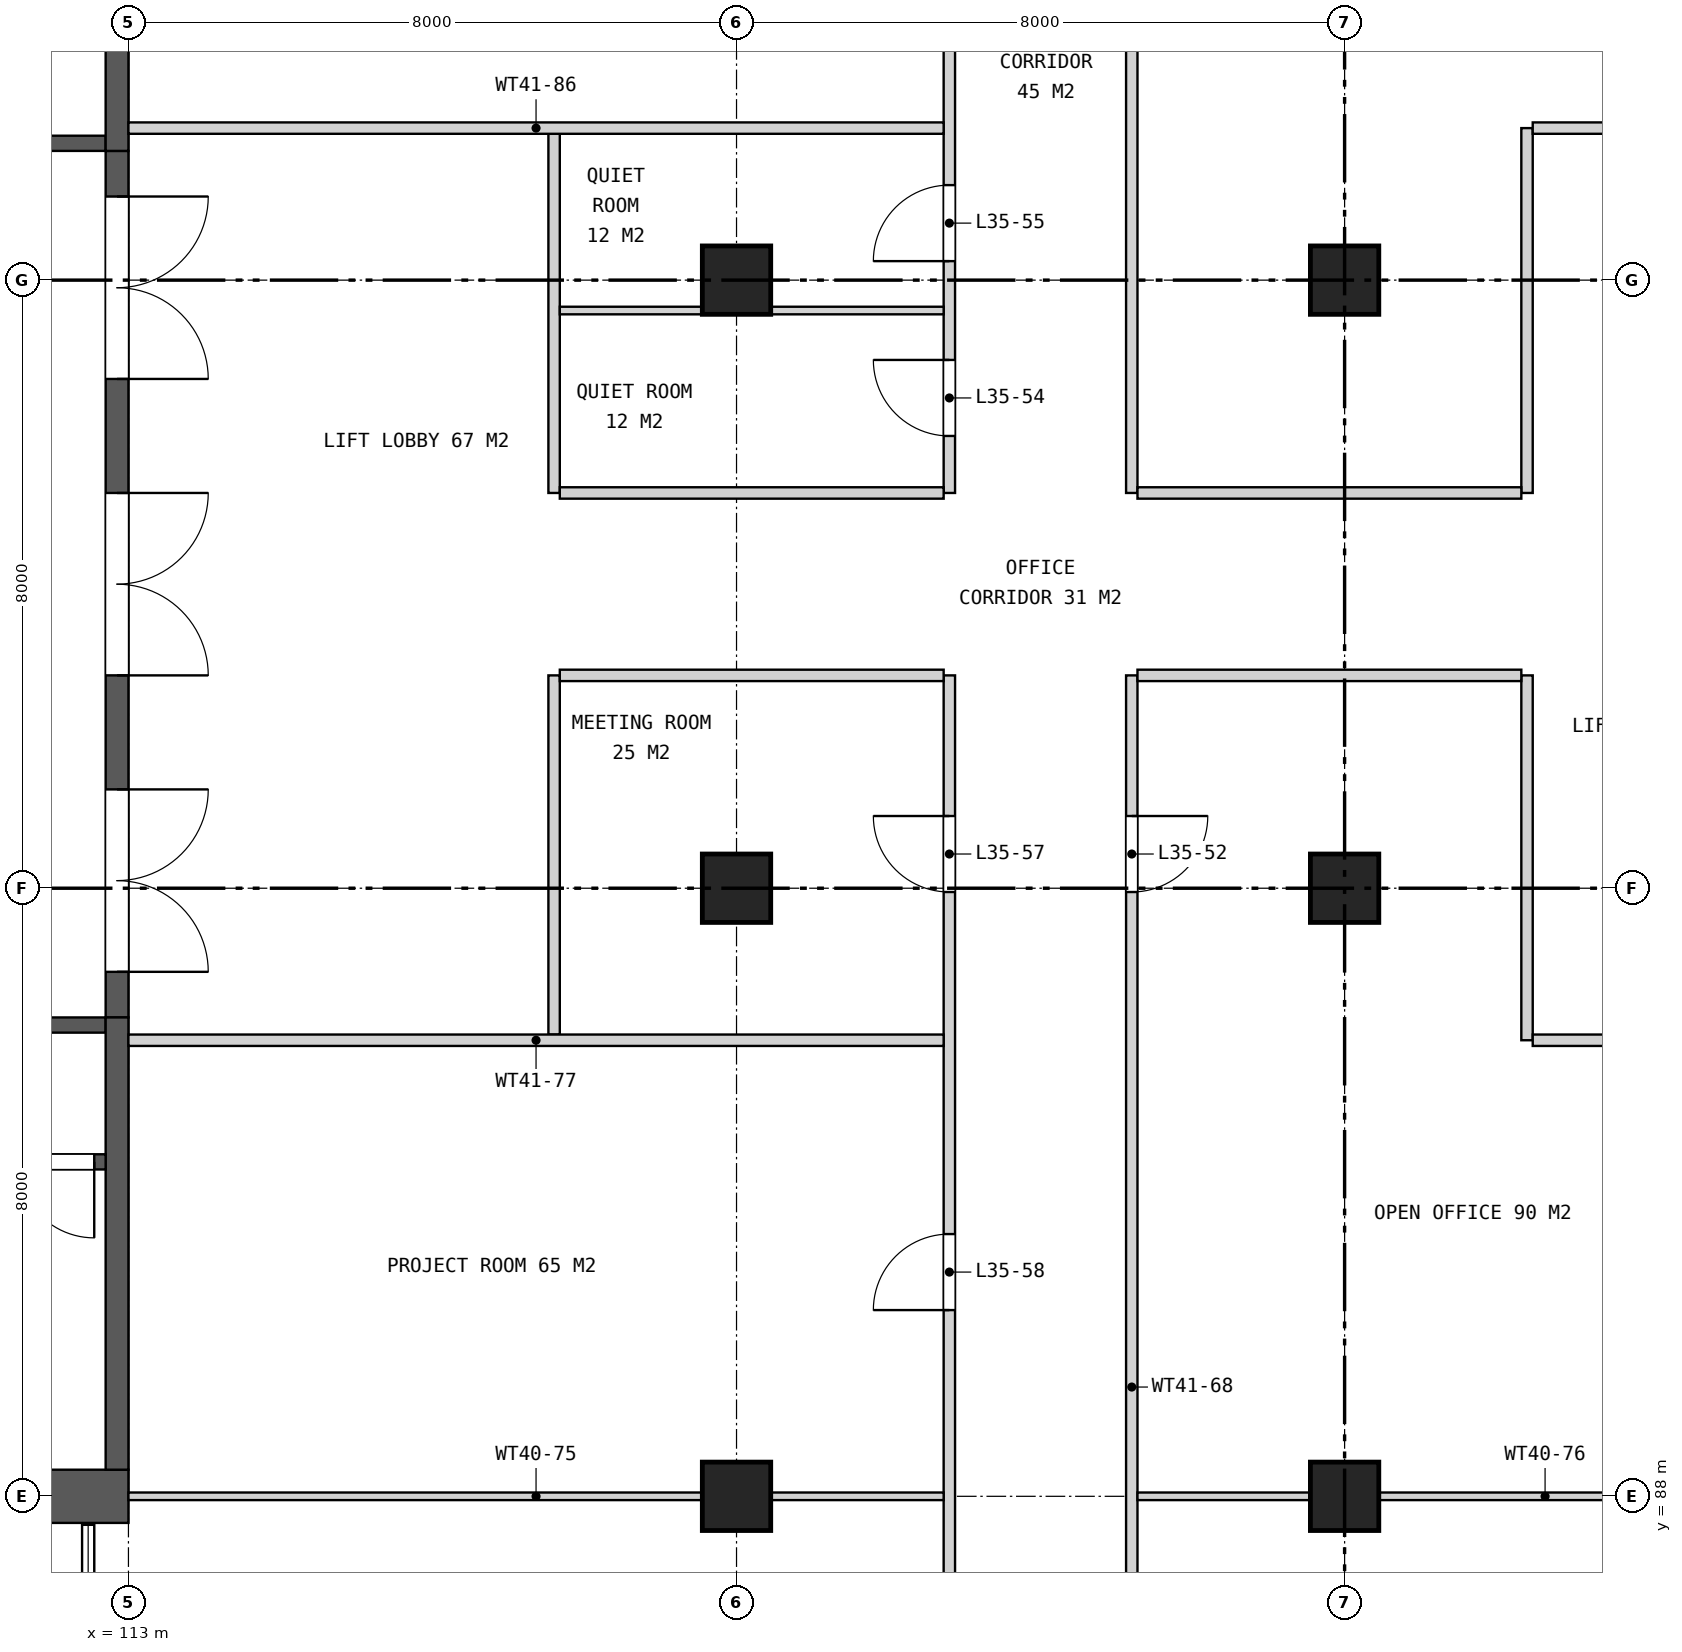
"""IFC4 building model, lengths in metres.
Left out: names, types, materials, properties, quantities, classifications, styles, units other than length and angle.
Written with IfcOpenShell. Run it as: python <this file> out.ifc"""

import sys

from ifc_helpers import new_model, si_unit, direction, frame, frame_2d, origin, origin_2d, place, context, subcontext, project, spatial, rectangle, extrude, element, fill, save


model = new_model("IFC4")
c1 = context("Model", 3, precision=1e-05, world=origin(), true_north=direction((0.0, 1.0)))
c2 = subcontext(c1, "Body", "Model", "MODEL_VIEW")
j1 = project(units=[si_unit("LENGTHUNIT", "METRE"), si_unit("PLANEANGLEUNIT", "RADIAN")], contexts=[c1])
p1 = place(None, origin())
s1 = spatial("IfcSite", under=j1, at=p1, CompositionType="ELEMENT")
p2 = place(p1, origin())
s2 = spatial("IfcBuilding", under=s1, at=p2, CompositionType="ELEMENT")
p3 = place(p2, frame((0.0, 0.0, 167.3)))
s3 = spatial("IfcBuildingStorey", under=s2, at=p3, CompositionType="ELEMENT", Elevation=167.3)
for number, where, z_axis, x_axis in (
    (1, (121.0, 88.0, 0.0), (0.0, 0.0, 1.0), (1.0, 0.0, 0.0)),
    (2, (121.0, 96.0, 0.0), (0.0, 0.0, 1.0), (1.0, 0.0, 0.0)),
    (3, (121.0, 104.0, 0.0), (0.0, 0.0, 1.0), (1.0, 0.0, 0.0)),
    (4, (129.0, 88.0, 0.0), (0.0, 0.0, 1.0), (1.0, 0.0, 0.0)),
    (5, (129.0, 96.0, 0.0), (0.0, 0.0, 1.0), (1.0, 0.0, 0.0)),
    (6, (129.0, 104.0, 0.0), (0.0, 0.0, 1.0), (1.0, 0.0, 0.0)),
):
    element("IfcColumn", number, at=place(p3, frame(where, z_axis=z_axis, x_axis=x_axis)), inside=s3, PredefinedType="COLUMN", context=c2, shape_type="SweptSolid", body=[
        extrude(rectangle(XDim=0.9, YDim=0.9, at=origin_2d()), origin(), (0.0, 0.0, 1.0), 4.2),
    ])
p4 = place(p3, frame((113.0, 88.0, 0.0), z_axis=(0.0, 0.0, 1.0), x_axis=(-1.0, 0.0, 0.0)))
e7 = element("IfcWall", 7, at=p4, inside=s3, PredefinedType="SHEAR", context=c2, shape_type="SweptSolid", body=[
    extrude(rectangle(XDim=7.1, YDim=0.7, at=frame_2d((3.55, 0.0))), origin(), (0.0, 0.0, 1.0), 4.2),
])
p5 = place(p3, frame((112.85, 105.7, 0.0), z_axis=(0.0, 0.0, 1.0), x_axis=(0.0, -1.0, 0.0)))
e8 = element("IfcWall", 8, at=p5, inside=s3, PredefinedType="SHEAR", context=c2, shape_type="SweptSolid", body=[
    extrude(rectangle(XDim=11.4, YDim=0.3, at=frame_2d((5.7, 0.0))), origin(), (0.0, 0.0, 1.0), 4.2),
])
p6 = place(p5, frame((0.6, 0.0, 0.0)))
e9 = element("IfcOpeningElement", 9, at=p6, cuts=e8, PredefinedType="OPENING", context=c2, shape_type="SweptSolid", body=[
    extrude(rectangle(XDim=2.4, YDim=2.4, at=frame_2d((1.2, 1.2))), frame((0.0, 0.16, 0.0), z_axis=(0.0, -1.0, 0.0), x_axis=(1.0, 0.0, 0.0)), (0.0, 0.0, 1.0), 0.32),
])
p7 = place(p5, frame((4.5, 0.0, 0.0)))
e10 = element("IfcOpeningElement", 10, at=p7, cuts=e8, PredefinedType="OPENING", context=c2, shape_type="SweptSolid", body=[
    extrude(rectangle(XDim=2.4, YDim=2.4, at=frame_2d((1.2, 1.2))), frame((0.0, 0.16, 0.0), z_axis=(0.0, -1.0, 0.0), x_axis=(1.0, 0.0, 0.0)), (0.0, 0.0, 1.0), 0.32),
])
p8 = place(p5, frame((8.4, 0.0, 0.0)))
e11 = element("IfcOpeningElement", 11, at=p8, cuts=e8, PredefinedType="OPENING", context=c2, shape_type="SweptSolid", body=[
    extrude(rectangle(XDim=2.4, YDim=2.4, at=frame_2d((1.2, 1.2))), frame((0.0, 0.16, 0.0), z_axis=(0.0, -1.0, 0.0), x_axis=(1.0, 0.0, 0.0)), (0.0, 0.0, 1.0), 0.32),
])
p9 = place(p3, frame((112.7, 94.2, 0.0), z_axis=(0.0, 0.0, 1.0), x_axis=(-1.0, 0.0, 0.0)))
e12 = element("IfcWall", 12, at=p9, inside=s3, PredefinedType="SHEAR", context=c2, shape_type="SweptSolid", body=[
    extrude(rectangle(XDim=15.35, YDim=0.2, at=frame_2d((7.675, 0.0))), origin(), (0.0, 0.0, 1.0), 4.2),
])
p10 = place(p9, frame((0.95, 0.0, 0.0)))
e13 = element("IfcOpeningElement", 13, at=p10, cuts=e12, PredefinedType="OPENING", context=c2, shape_type="SweptSolid", body=[
    extrude(rectangle(XDim=1.1, YDim=2.1, at=frame_2d((0.55, 1.05))), frame((0.0, 0.11, 0.0), z_axis=(0.0, -1.0, 0.0), x_axis=(1.0, 0.0, 0.0)), (0.0, 0.0, 1.0), 0.22),
])
p11 = place(p3, frame((112.85, 94.3, 0.0), z_axis=(0.0, 0.0, 1.0), x_axis=(0.0, -1.0, 0.0)))
e14 = element("IfcWall", 14, at=p11, inside=s3, PredefinedType="SHEAR", context=c2, shape_type="SweptSolid", body=[
    extrude(rectangle(XDim=5.95, YDim=0.3, at=frame_2d((2.975, 0.0))), origin(), (0.0, 0.0, 1.0), 4.2),
])
p12 = place(p3, frame((112.7, 92.4, 0.0), z_axis=(0.0, 0.0, 1.0), x_axis=(-1.0, 0.0, 0.0)))
e15 = element("IfcWall", 15, at=p12, inside=s3, PredefinedType="SHEAR", context=c2, shape_type="SweptSolid", body=[
    extrude(rectangle(XDim=6.8, YDim=0.2, at=frame_2d((3.4, 0.0))), origin(), (0.0, 0.0, 1.0), 4.2),
])
p13 = place(p12, frame((0.15, 0.0, 0.0)))
e16 = element("IfcOpeningElement", 16, at=p13, cuts=e15, PredefinedType="OPENING", context=c2, shape_type="SweptSolid", body=[
    extrude(rectangle(XDim=1.0, YDim=2.1, at=frame_2d((0.5, 1.05))), frame((0.0, 0.11, 0.0), z_axis=(0.0, -1.0, 0.0), x_axis=(1.0, 0.0, 0.0)), (0.0, 0.0, 1.0), 0.22),
])
p14 = place(p3, frame((112.7, 105.8, 0.0), z_axis=(0.0, 0.0, 1.0), x_axis=(-1.0, 0.0, 0.0)))
e17 = element("IfcWall", 17, at=p14, inside=s3, PredefinedType="SHEAR", context=c2, shape_type="SweptSolid", body=[
    extrude(rectangle(XDim=15.35, YDim=0.2, at=frame_2d((7.675, 0.0))), origin(), (0.0, 0.0, 1.0), 4.2),
])
p15 = place(p14, frame((0.95, 0.0, 0.0)))
e18 = element("IfcOpeningElement", 18, at=p15, cuts=e17, PredefinedType="OPENING", context=c2, shape_type="SweptSolid", body=[
    extrude(rectangle(XDim=1.1, YDim=2.1, at=frame_2d((0.55, 1.05))), frame((0.0, 0.11, 0.0), z_axis=(0.0, -1.0, 0.0), x_axis=(1.0, 0.0, 0.0)), (0.0, 0.0, 1.0), 0.22),
])
p16 = place(p3, frame((112.85, 111.65, 0.0), z_axis=(0.0, 0.0, 1.0), x_axis=(0.0, -1.0, 0.0)))
e19 = element("IfcWall", 19, at=p16, inside=s3, PredefinedType="SHEAR", context=c2, shape_type="SweptSolid", body=[
    extrude(rectangle(XDim=5.95, YDim=0.3, at=frame_2d((2.975, 0.0))), origin(), (0.0, 0.0, 1.0), 4.2),
])
for number, where, z_axis, x_axis in (
    (20, (118.6, 94.075, 0.0), (0.0, 0.0, 1.0), (0.0, 1.0, 0.0)),
    (21, (118.6, 101.2, 0.0), (0.0, 0.0, 1.0), (0.0, 1.0, 0.0)),
):
    element("IfcWall", number, at=place(p3, frame(where, z_axis=z_axis, x_axis=x_axis)), inside=s3, PredefinedType="PARTITIONING", context=c2, shape_type="SweptSolid", body=[
        extrude(rectangle(XDim=4.725, YDim=0.15, at=frame_2d((2.363, 0.0))), origin(), (0.0, 0.0, 1.0), 3.26),
    ])
p17 = place(p3, frame((123.8, 80.075, 0.0), z_axis=(0.0, 0.0, 1.0), x_axis=(0.0, 1.0, 0.0)))
e22 = element("IfcWall", 22, at=p17, inside=s3, PredefinedType="PARTITIONING", context=c2, shape_type="SweptSolid", body=[
    extrude(rectangle(XDim=18.725, YDim=0.15, at=frame_2d((9.363, 0.0))), origin(), (0.0, 0.0, 1.0), 3.26),
])
p18 = place(p17, frame((15.875, 0.0, 0.0)))
e23 = element("IfcOpeningElement", 23, at=p18, cuts=e22, PredefinedType="OPENING", context=c2, shape_type="SweptSolid", body=[
    extrude(rectangle(XDim=1.0, YDim=2.1, at=frame_2d((0.5, 1.05))), frame((0.0, 0.085, 0.0), z_axis=(0.0, -1.0, 0.0), x_axis=(1.0, 0.0, 0.0)), (0.0, 0.0, 1.0), 0.17),
])
p19 = place(p17, frame((10.375, 0.0, 0.0)))
e24 = element("IfcOpeningElement", 24, at=p19, cuts=e22, PredefinedType="OPENING", context=c2, shape_type="SweptSolid", body=[
    extrude(rectangle(XDim=1.0, YDim=2.1, at=frame_2d((0.5, 1.05))), frame((0.0, 0.085, 0.0), z_axis=(0.0, -1.0, 0.0), x_axis=(1.0, 0.0, 0.0)), (0.0, 0.0, 1.0), 0.17),
])
p20 = place(p17, frame((3.45, 0.0, 0.0)))
e25 = element("IfcOpeningElement", 25, at=p20, cuts=e22, PredefinedType="OPENING", context=c2, shape_type="SweptSolid", body=[
    extrude(rectangle(XDim=1.0, YDim=2.1, at=frame_2d((0.5, 1.05))), frame((0.0, 0.085, 0.0), z_axis=(0.0, -1.0, 0.0), x_axis=(1.0, 0.0, 0.0)), (0.0, 0.0, 1.0), 0.17),
])
p21 = place(p3, frame((123.8, 101.2, 0.0), z_axis=(0.0, 0.0, 1.0), x_axis=(0.0, 1.0, 0.0)))
e26 = element("IfcWall", 26, at=p21, inside=s3, PredefinedType="PARTITIONING", context=c2, shape_type="SweptSolid", body=[
    extrude(rectangle(XDim=18.725, YDim=0.15, at=frame_2d((9.363, 0.0))), origin(), (0.0, 0.0, 1.0), 3.26),
])
p22 = place(p21, frame((0.75, 0.0, 0.0)))
e27 = element("IfcOpeningElement", 27, at=p22, cuts=e26, PredefinedType="OPENING", context=c2, shape_type="SweptSolid", body=[
    extrude(rectangle(XDim=1.0, YDim=2.1, at=frame_2d((0.5, 1.05))), frame((0.0, 0.085, 0.0), z_axis=(0.0, -1.0, 0.0), x_axis=(1.0, 0.0, 0.0)), (0.0, 0.0, 1.0), 0.17),
])
p23 = place(p21, frame((3.05, 0.0, 0.0)))
e28 = element("IfcOpeningElement", 28, at=p23, cuts=e26, PredefinedType="OPENING", context=c2, shape_type="SweptSolid", body=[
    extrude(rectangle(XDim=1.0, YDim=2.1, at=frame_2d((0.5, 1.05))), frame((0.0, 0.085, 0.0), z_axis=(0.0, -1.0, 0.0), x_axis=(1.0, 0.0, 0.0)), (0.0, 0.0, 1.0), 0.17),
])
p24 = place(p21, frame((10.85, 0.0, 0.0)))
e29 = element("IfcOpeningElement", 29, at=p24, cuts=e26, PredefinedType="OPENING", context=c2, shape_type="SweptSolid", body=[
    extrude(rectangle(XDim=1.8, YDim=2.1, at=frame_2d((0.9, 1.05))), frame((0.0, 0.085, 0.0), z_axis=(0.0, -1.0, 0.0), x_axis=(1.0, 0.0, 0.0)), (0.0, 0.0, 1.0), 0.17),
])
p25 = place(p3, frame((126.2, 80.075, 0.0), z_axis=(0.0, 0.0, 1.0), x_axis=(0.0, 1.0, 0.0)))
e30 = element("IfcWall", 30, at=p25, inside=s3, PredefinedType="PARTITIONING", context=c2, shape_type="SweptSolid", body=[
    extrude(rectangle(XDim=18.725, YDim=0.15, at=frame_2d((9.363, 0.0))), origin(), (0.0, 0.0, 1.0), 3.26),
])
p26 = place(p25, frame((15.875, 0.0, 0.0)))
e31 = element("IfcOpeningElement", 31, at=p26, cuts=e30, PredefinedType="OPENING", context=c2, shape_type="SweptSolid", body=[
    extrude(rectangle(XDim=1.0, YDim=2.1, at=frame_2d((0.5, 1.05))), frame((0.0, 0.085, 0.0), z_axis=(0.0, -1.0, 0.0), x_axis=(1.0, 0.0, 0.0)), (0.0, 0.0, 1.0), 0.17),
])
p27 = place(p25, frame((3.45, 0.0, 0.0)))
e32 = element("IfcOpeningElement", 32, at=p27, cuts=e30, PredefinedType="OPENING", context=c2, shape_type="SweptSolid", body=[
    extrude(rectangle(XDim=1.0, YDim=2.1, at=frame_2d((0.5, 1.05))), frame((0.0, 0.085, 0.0), z_axis=(0.0, -1.0, 0.0), x_axis=(1.0, 0.0, 0.0)), (0.0, 0.0, 1.0), 0.17),
])
p28 = place(p3, frame((126.2, 101.2, 0.0), z_axis=(0.0, 0.0, 1.0), x_axis=(0.0, 1.0, 0.0)))
e33 = element("IfcWall", 33, at=p28, inside=s3, PredefinedType="PARTITIONING", context=c2, shape_type="SweptSolid", body=[
    extrude(rectangle(XDim=18.725, YDim=0.15, at=frame_2d((9.363, 0.0))), origin(), (0.0, 0.0, 1.0), 3.26),
])
p29 = place(p28, frame((7.35, 0.0, 0.0)))
e34 = element("IfcOpeningElement", 34, at=p29, cuts=e33, PredefinedType="OPENING", context=c2, shape_type="SweptSolid", body=[
    extrude(rectangle(XDim=1.0, YDim=2.1, at=frame_2d((0.5, 1.05))), frame((0.0, 0.085, 0.0), z_axis=(0.0, -1.0, 0.0), x_axis=(1.0, 0.0, 0.0)), (0.0, 0.0, 1.0), 0.17),
])
p30 = place(p28, frame((14.25, 0.0, 0.0)))
e35 = element("IfcOpeningElement", 35, at=p30, cuts=e33, PredefinedType="OPENING", context=c2, shape_type="SweptSolid", body=[
    extrude(rectangle(XDim=1.0, YDim=2.1, at=frame_2d((0.5, 1.05))), frame((0.0, 0.085, 0.0), z_axis=(0.0, -1.0, 0.0), x_axis=(1.0, 0.0, 0.0)), (0.0, 0.0, 1.0), 0.17),
])
for number, where, z_axis, x_axis in (
    (36, (131.4, 94.0, 0.0), (0.0, 0.0, 1.0), (0.0, 1.0, 0.0)),
    (37, (131.4, 101.2, 0.0), (0.0, 0.0, 1.0), (0.0, 1.0, 0.0)),
):
    element("IfcWall", number, at=place(p3, frame(where, z_axis=z_axis, x_axis=x_axis)), inside=s3, PredefinedType="PARTITIONING", context=c2, shape_type="SweptSolid", body=[
        extrude(rectangle(XDim=4.8, YDim=0.15, at=frame_2d((2.4, 0.0))), origin(), (0.0, 0.0, 1.0), 3.26),
    ])
for number, where, z_axis, x_axis in (
    (38, (113.0, 88.0, 0.0), (0.0, 0.0, 1.0), (1.0, 0.0, 0.0)),
    (39, (126.275, 88.0, 0.0), (0.0, 0.0, 1.0), (1.0, 0.0, 0.0)),
):
    element("IfcWall", number, at=place(p3, frame(where, z_axis=z_axis, x_axis=x_axis)), inside=s3, PredefinedType="PARTITIONING", context=c2, shape_type="SweptSolid", body=[
        extrude(rectangle(XDim=10.725, YDim=0.1, at=frame_2d((5.363, 0.0))), origin(), (0.0, 0.0, 1.0), 3.26),
    ])
p31 = place(p3, frame((113.0, 94.0, 0.0), z_axis=(0.0, 0.0, 1.0), x_axis=(1.0, 0.0, 0.0)))
e40 = element("IfcWall", 40, at=p31, inside=s3, PredefinedType="PARTITIONING", context=c2, shape_type="SweptSolid", body=[
    extrude(rectangle(XDim=10.725, YDim=0.15, at=frame_2d((5.363, 0.0))), origin(), (0.0, 0.0, 1.0), 3.26),
])
p32 = place(p3, frame((131.475, 94.0, 0.0), z_axis=(0.0, 0.0, 1.0), x_axis=(1.0, 0.0, 0.0)))
e41 = element("IfcWall", 41, at=p32, inside=s3, PredefinedType="PARTITIONING", context=c2, shape_type="SweptSolid", body=[
    extrude(rectangle(XDim=5.525, YDim=0.15, at=frame_2d((2.762, 0.0))), origin(), (0.0, 0.0, 1.0), 3.26),
])
for number, where, z_axis, x_axis in (
    (42, (118.675, 98.8, 0.0), (0.0, 0.0, 1.0), (1.0, 0.0, 0.0)),
    (43, (126.275, 98.8, 0.0), (0.0, 0.0, 1.0), (1.0, 0.0, 0.0)),
    (44, (118.675, 101.2, 0.0), (0.0, 0.0, 1.0), (1.0, 0.0, 0.0)),
    (45, (126.275, 101.2, 0.0), (0.0, 0.0, 1.0), (1.0, 0.0, 0.0)),
):
    element("IfcWall", number, at=place(p3, frame(where, z_axis=z_axis, x_axis=x_axis)), inside=s3, PredefinedType="PARTITIONING", context=c2, shape_type="SweptSolid", body=[
        extrude(rectangle(XDim=5.05, YDim=0.15, at=frame_2d((2.525, 0.0))), origin(), (0.0, 0.0, 1.0), 3.26),
    ])
p33 = place(p3, frame((118.675, 103.6, 0.0), z_axis=(0.0, 0.0, 1.0), x_axis=(1.0, 0.0, 0.0)))
e46 = element("IfcWall", 46, at=p33, inside=s3, PredefinedType="PARTITIONING", context=c2, shape_type="SweptSolid", body=[
    extrude(rectangle(XDim=5.05, YDim=0.1, at=frame_2d((2.525, 0.0))), origin(), (0.0, 0.0, 1.0), 3.26),
])
p34 = place(p3, frame((113.0, 106.0, 0.0), z_axis=(0.0, 0.0, 1.0), x_axis=(1.0, 0.0, 0.0)))
e47 = element("IfcWall", 47, at=p34, inside=s3, PredefinedType="PARTITIONING", context=c2, shape_type="SweptSolid", body=[
    extrude(rectangle(XDim=10.725, YDim=0.15, at=frame_2d((5.363, 0.0))), origin(), (0.0, 0.0, 1.0), 3.26),
])
p35 = place(p3, frame((131.475, 106.0, 0.0), z_axis=(0.0, 0.0, 1.0), x_axis=(1.0, 0.0, 0.0)))
e48 = element("IfcWall", 48, at=p35, inside=s3, PredefinedType="PARTITIONING", context=c2, shape_type="SweptSolid", body=[
    extrude(rectangle(XDim=5.525, YDim=0.15, at=frame_2d((2.762, 0.0))), origin(), (0.0, 0.0, 1.0), 3.26),
])
p36 = place(p6, origin())
e49 = element("IfcDoor", 49, at=p36, inside=s3, OperationType="DOUBLE_DOOR_SINGLE_SWING", PredefinedType="DOOR", context=c2, shape_type="SweptSolid", body=[
    extrude(rectangle(XDim=2.4, YDim=2.4, at=frame_2d((1.2, 1.2))), frame((0.0, 0.025, 0.0), z_axis=(0.0, -1.0, 0.0), x_axis=(1.0, 0.0, 0.0)), (0.0, 0.0, 1.0), 0.05),
])
fill(e9, e49)
p37 = place(p7, origin())
e50 = element("IfcDoor", 50, at=p37, inside=s3, OperationType="DOUBLE_DOOR_SINGLE_SWING", PredefinedType="DOOR", context=c2, shape_type="SweptSolid", body=[
    extrude(rectangle(XDim=2.4, YDim=2.4, at=frame_2d((1.2, 1.2))), frame((0.0, 0.025, 0.0), z_axis=(0.0, -1.0, 0.0), x_axis=(1.0, 0.0, 0.0)), (0.0, 0.0, 1.0), 0.05),
])
fill(e10, e50)
p38 = place(p8, origin())
e51 = element("IfcDoor", 51, at=p38, inside=s3, OperationType="DOUBLE_DOOR_SINGLE_SWING", PredefinedType="DOOR", context=c2, shape_type="SweptSolid", body=[
    extrude(rectangle(XDim=2.4, YDim=2.4, at=frame_2d((1.2, 1.2))), frame((0.0, 0.025, 0.0), z_axis=(0.0, -1.0, 0.0), x_axis=(1.0, 0.0, 0.0)), (0.0, 0.0, 1.0), 0.05),
])
fill(e11, e51)
p39 = place(p13, origin())
e52 = element("IfcDoor", 52, at=p39, inside=s3, OperationType="SINGLE_SWING_LEFT", PredefinedType="DOOR", context=c2, shape_type="SweptSolid", body=[
    extrude(rectangle(XDim=1.0, YDim=2.1, at=frame_2d((0.5, 1.05))), frame((0.0, 0.025, 0.0), z_axis=(0.0, -1.0, 0.0), x_axis=(1.0, 0.0, 0.0)), (0.0, 0.0, 1.0), 0.05),
])
fill(e16, e52)
p40 = place(p26, frame((1.0, 0.0, 0.0), z_axis=(0.0, 0.0, 1.0), x_axis=(-1.0, 0.0, 0.0)))
e53 = element("IfcDoor", 53, at=p40, inside=s3, OperationType="SINGLE_SWING_LEFT", PredefinedType="DOOR", context=c2, shape_type="SweptSolid", body=[
    extrude(rectangle(XDim=1.0, YDim=2.1, at=frame_2d((0.5, 1.05))), frame((0.0, 0.025, 0.0), z_axis=(0.0, -1.0, 0.0), x_axis=(1.0, 0.0, 0.0)), (0.0, 0.0, 1.0), 0.05),
])
fill(e31, e53)
p41 = place(p22, origin())
e54 = element("IfcDoor", 54, at=p41, inside=s3, OperationType="SINGLE_SWING_RIGHT", PredefinedType="DOOR", context=c2, shape_type="SweptSolid", body=[
    extrude(rectangle(XDim=1.0, YDim=2.1, at=frame_2d((0.5, 1.05))), frame((0.0, 0.025, 0.0), z_axis=(0.0, -1.0, 0.0), x_axis=(1.0, 0.0, 0.0)), (0.0, 0.0, 1.0), 0.05),
])
fill(e27, e54)
p42 = place(p23, origin())
e55 = element("IfcDoor", 55, at=p42, inside=s3, OperationType="SINGLE_SWING_LEFT", PredefinedType="DOOR", context=c2, shape_type="SweptSolid", body=[
    extrude(rectangle(XDim=1.0, YDim=2.1, at=frame_2d((0.5, 1.05))), frame((0.0, 0.025, 0.0), z_axis=(0.0, -1.0, 0.0), x_axis=(1.0, 0.0, 0.0)), (0.0, 0.0, 1.0), 0.05),
])
fill(e28, e55)
p43 = place(p18, origin())
e56 = element("IfcDoor", 56, at=p43, inside=s3, OperationType="SINGLE_SWING_RIGHT", PredefinedType="DOOR", context=c2, shape_type="SweptSolid", body=[
    extrude(rectangle(XDim=1.0, YDim=2.1, at=frame_2d((0.5, 1.05))), frame((0.0, 0.025, 0.0), z_axis=(0.0, -1.0, 0.0), x_axis=(1.0, 0.0, 0.0)), (0.0, 0.0, 1.0), 0.05),
])
fill(e23, e56)
p44 = place(p19, origin())
e57 = element("IfcDoor", 57, at=p44, inside=s3, OperationType="SINGLE_SWING_LEFT", PredefinedType="DOOR", context=c2, shape_type="SweptSolid", body=[
    extrude(rectangle(XDim=1.0, YDim=2.1, at=frame_2d((0.5, 1.05))), frame((0.0, 0.025, 0.0), z_axis=(0.0, -1.0, 0.0), x_axis=(1.0, 0.0, 0.0)), (0.0, 0.0, 1.0), 0.05),
])
fill(e24, e57)
save(model, sys.argv[1])
